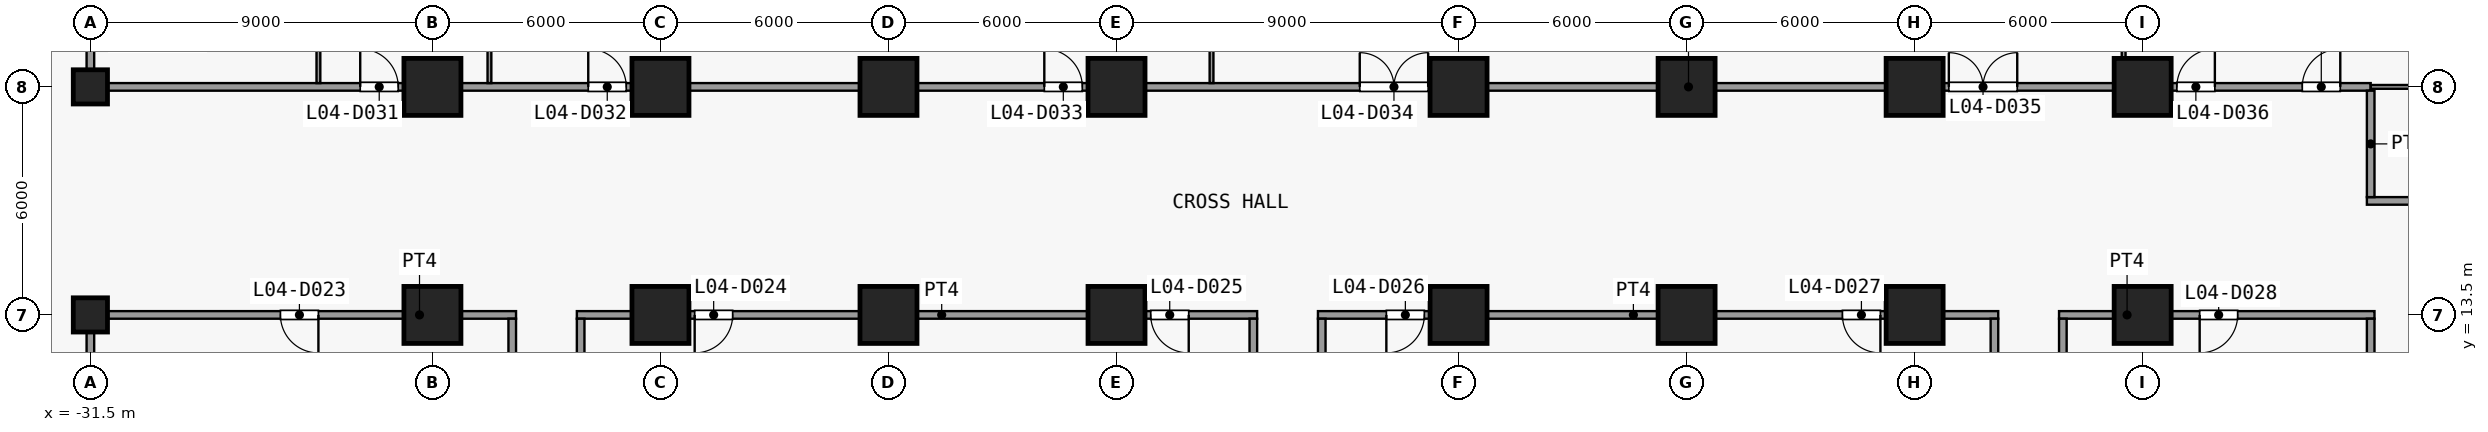
"""IFC4 building model, lengths in metres.
Left out: names, types, materials, properties, quantities, classifications, styles, units other than length and angle.
Written with IfcOpenShell. Run it as: python <this file> out.ifc"""

import sys

from ifc_helpers import new_model, si_unit, direction, frame, frame_2d, origin, origin_2d, place, context, subcontext, project, spatial, rectangle, extrude, element, fill, save


model = new_model("IFC4")
c1 = context("Model", 3, precision=1e-05, world=origin(), true_north=direction((0.0, 1.0)))
c2 = subcontext(c1, "Body", "Model", "MODEL_VIEW")
j1 = project(units=[si_unit("LENGTHUNIT", "METRE"), si_unit("PLANEANGLEUNIT", "RADIAN")], contexts=[c1])
p1 = place(None, origin())
s1 = spatial("IfcSite", under=j1, at=p1, CompositionType="ELEMENT")
p2 = place(p1, origin())
s2 = spatial("IfcBuilding", under=s1, at=p2, CompositionType="ELEMENT")
p3 = place(p2, frame((0.0, 0.0, 23.5)))
s3 = spatial("IfcBuildingStorey", under=s2, at=p3, CompositionType="ELEMENT", Elevation=23.5)
for number, where, z_axis, x_axis in (
    (1, (-31.5, 13.5, 0.0), (0.0, 0.0, 1.0), (1.0, 0.0, 0.0)),
    (2, (-31.5, 19.5, 0.0), (0.0, 0.0, 1.0), (1.0, 0.0, 0.0)),
):
    element("IfcColumn", number, at=place(p3, frame(where, z_axis=z_axis, x_axis=x_axis)), inside=s3, PredefinedType="COLUMN", context=c2, shape_type="SweptSolid", body=[
        extrude(rectangle(XDim=0.9, YDim=0.9, at=origin_2d()), origin(), (0.0, 0.0, 1.0), 4.5),
    ])
for number, where, z_axis, x_axis in (
    (3, (-22.5, 13.5, 0.0), (0.0, 0.0, 1.0), (1.0, 0.0, 0.0)),
    (4, (-22.5, 19.5, 0.0), (0.0, 0.0, 1.0), (1.0, 0.0, 0.0)),
    (5, (-16.5, 13.5, 0.0), (0.0, 0.0, 1.0), (1.0, 0.0, 0.0)),
    (6, (-16.5, 19.5, 0.0), (0.0, 0.0, 1.0), (1.0, 0.0, 0.0)),
    (7, (-10.5, 13.5, 0.0), (0.0, 0.0, 1.0), (1.0, 0.0, 0.0)),
    (8, (-10.5, 19.5, 0.0), (0.0, 0.0, 1.0), (1.0, 0.0, 0.0)),
    (9, (-4.5, 13.5, 0.0), (0.0, 0.0, 1.0), (1.0, 0.0, 0.0)),
    (10, (-4.5, 19.5, 0.0), (0.0, 0.0, 1.0), (1.0, 0.0, 0.0)),
    (11, (4.5, 13.5, 0.0), (0.0, 0.0, 1.0), (1.0, 0.0, 0.0)),
    (12, (4.5, 19.5, 0.0), (0.0, 0.0, 1.0), (1.0, 0.0, 0.0)),
    (13, (10.5, 13.5, 0.0), (0.0, 0.0, 1.0), (1.0, 0.0, 0.0)),
    (14, (10.5, 19.5, 0.0), (0.0, 0.0, 1.0), (1.0, 0.0, 0.0)),
    (15, (16.5, 13.5, 0.0), (0.0, 0.0, 1.0), (1.0, 0.0, 0.0)),
    (16, (16.5, 19.5, 0.0), (0.0, 0.0, 1.0), (1.0, 0.0, 0.0)),
    (17, (22.5, 13.5, 0.0), (0.0, 0.0, 1.0), (1.0, 0.0, 0.0)),
    (18, (22.5, 19.5, 0.0), (0.0, 0.0, 1.0), (1.0, 0.0, 0.0)),
):
    element("IfcColumn", number, at=place(p3, frame(where, z_axis=z_axis, x_axis=x_axis)), inside=s3, PredefinedType="COLUMN", context=c2, shape_type="SweptSolid", body=[
        extrude(rectangle(XDim=1.5, YDim=1.5, at=origin_2d()), origin(), (0.0, 0.0, 1.0), 4.5),
    ])
p4 = place(p3, frame((-31.6, 13.5, 0.0), z_axis=(0.0, 0.0, 1.0), x_axis=(1.0, 0.0, 0.0)))
e19 = element("IfcWall", 19, at=p4, inside=s3, PredefinedType="PARTITIONING", context=c2, shape_type="SweptSolid", body=[
    extrude(rectangle(XDim=11.3, YDim=0.2, at=frame_2d((5.65, 0.0))), origin(), (0.0, 0.0, 1.0), 4.15),
])
p5 = place(p4, frame((5.1, 0.0, 0.0)))
e20 = element("IfcOpeningElement", 20, at=p5, cuts=e19, PredefinedType="OPENING", context=c2, shape_type="SweptSolid", body=[
    extrude(rectangle(XDim=1.0, YDim=2.1, at=frame_2d((0.5, 1.05))), frame((0.0, 0.11, 0.0), z_axis=(0.0, -1.0, 0.0), x_axis=(1.0, 0.0, 0.0)), (0.0, 0.0, 1.0), 0.22),
])
p6 = place(p3, frame((-18.7, 13.5, 0.0), z_axis=(0.0, 0.0, 1.0), x_axis=(1.0, 0.0, 0.0)))
e21 = element("IfcWall", 21, at=p6, inside=s3, PredefinedType="PARTITIONING", context=c2, shape_type="SweptSolid", body=[
    extrude(rectangle(XDim=17.9, YDim=0.2, at=frame_2d((8.95, 0.0))), origin(), (0.0, 0.0, 1.0), 4.15),
])
p7 = place(p6, frame((3.1, 0.0, 0.0)))
e22 = element("IfcOpeningElement", 22, at=p7, cuts=e21, PredefinedType="OPENING", context=c2, shape_type="SweptSolid", body=[
    extrude(rectangle(XDim=1.0, YDim=2.1, at=frame_2d((0.5, 1.05))), frame((0.0, 0.11, 0.0), z_axis=(0.0, -1.0, 0.0), x_axis=(1.0, 0.0, 0.0)), (0.0, 0.0, 1.0), 0.22),
])
p8 = place(p6, frame((15.1, 0.0, 0.0)))
e23 = element("IfcOpeningElement", 23, at=p8, cuts=e21, PredefinedType="OPENING", context=c2, shape_type="SweptSolid", body=[
    extrude(rectangle(XDim=1.0, YDim=2.1, at=frame_2d((0.5, 1.05))), frame((0.0, 0.11, 0.0), z_axis=(0.0, -1.0, 0.0), x_axis=(1.0, 0.0, 0.0)), (0.0, 0.0, 1.0), 0.22),
])
p9 = place(p3, frame((0.8, 13.5, 0.0), z_axis=(0.0, 0.0, 1.0), x_axis=(1.0, 0.0, 0.0)))
e24 = element("IfcWall", 24, at=p9, inside=s3, PredefinedType="PARTITIONING", context=c2, shape_type="SweptSolid", body=[
    extrude(rectangle(XDim=17.9, YDim=0.2, at=frame_2d((8.95, 0.0))), origin(), (0.0, 0.0, 1.0), 4.15),
])
p10 = place(p9, frame((1.8, 0.0, 0.0)))
e25 = element("IfcOpeningElement", 25, at=p10, cuts=e24, PredefinedType="OPENING", context=c2, shape_type="SweptSolid", body=[
    extrude(rectangle(XDim=1.0, YDim=2.1, at=frame_2d((0.5, 1.05))), frame((0.0, 0.11, 0.0), z_axis=(0.0, -1.0, 0.0), x_axis=(1.0, 0.0, 0.0)), (0.0, 0.0, 1.0), 0.22),
])
p11 = place(p9, frame((13.8, 0.0, 0.0)))
e26 = element("IfcOpeningElement", 26, at=p11, cuts=e24, PredefinedType="OPENING", context=c2, shape_type="SweptSolid", body=[
    extrude(rectangle(XDim=1.0, YDim=2.1, at=frame_2d((0.5, 1.05))), frame((0.0, 0.11, 0.0), z_axis=(0.0, -1.0, 0.0), x_axis=(1.0, 0.0, 0.0)), (0.0, 0.0, 1.0), 0.22),
])
p12 = place(p3, frame((20.3, 13.5, 0.0), z_axis=(0.0, 0.0, 1.0), x_axis=(1.0, 0.0, 0.0)))
e27 = element("IfcWall", 27, at=p12, inside=s3, PredefinedType="PARTITIONING", context=c2, shape_type="SweptSolid", body=[
    extrude(rectangle(XDim=8.3, YDim=0.2, at=frame_2d((4.15, 0.0))), origin(), (0.0, 0.0, 1.0), 4.15),
])
p13 = place(p12, frame((3.7, 0.0, 0.0)))
e28 = element("IfcOpeningElement", 28, at=p13, cuts=e27, PredefinedType="OPENING", context=c2, shape_type="SweptSolid", body=[
    extrude(rectangle(XDim=1.0, YDim=2.1, at=frame_2d((0.5, 1.05))), frame((0.0, 0.11, 0.0), z_axis=(0.0, -1.0, 0.0), x_axis=(1.0, 0.0, 0.0)), (0.0, 0.0, 1.0), 0.22),
])
p14 = place(p3, frame((28.4, 16.5, 0.0), z_axis=(0.0, 0.0, 1.0), x_axis=(1.0, 0.0, 0.0)))
e29 = element("IfcWall", 29, at=p14, inside=s3, PredefinedType="PARTITIONING", context=c2, shape_type="SweptSolid", body=[
    extrude(rectangle(XDim=24.2, YDim=0.2, at=frame_2d((12.1, 0.0))), origin(), (0.0, 0.0, 1.0), 4.15),
])
p15 = place(p14, frame((6.2, 0.0, 0.0)))
e30 = element("IfcOpeningElement", 30, at=p15, cuts=e29, PredefinedType="OPENING", context=c2, shape_type="SweptSolid", body=[
    extrude(rectangle(XDim=1.0, YDim=2.1, at=frame_2d((0.5, 1.05))), frame((0.0, 0.11, 0.0), z_axis=(0.0, -1.0, 0.0), x_axis=(1.0, 0.0, 0.0)), (0.0, 0.0, 1.0), 0.22),
])
p16 = place(p14, frame((17.0, 0.0, 0.0)))
e31 = element("IfcOpeningElement", 31, at=p16, cuts=e29, PredefinedType="OPENING", context=c2, shape_type="SweptSolid", body=[
    extrude(rectangle(XDim=1.0, YDim=2.1, at=frame_2d((0.5, 1.05))), frame((0.0, 0.11, 0.0), z_axis=(0.0, -1.0, 0.0), x_axis=(1.0, 0.0, 0.0)), (0.0, 0.0, 1.0), 0.22),
])
p17 = place(p3, frame((-31.6, 19.5, 0.0), z_axis=(0.0, 0.0, 1.0), x_axis=(1.0, 0.0, 0.0)))
e32 = element("IfcWall", 32, at=p17, inside=s3, PredefinedType="PARTITIONING", context=c2, shape_type="SweptSolid", body=[
    extrude(rectangle(XDim=60.1, YDim=0.2, at=frame_2d((30.05, 0.0))), origin(), (0.0, 0.0, 1.0), 4.15),
])
p18 = place(p17, frame((7.2, 0.0, 0.0)))
e33 = element("IfcOpeningElement", 33, at=p18, cuts=e32, PredefinedType="OPENING", context=c2, shape_type="SweptSolid", body=[
    extrude(rectangle(XDim=1.0, YDim=2.1, at=frame_2d((0.5, 1.05))), frame((0.0, 0.11, 0.0), z_axis=(0.0, -1.0, 0.0), x_axis=(1.0, 0.0, 0.0)), (0.0, 0.0, 1.0), 0.22),
])
p19 = place(p17, frame((13.2, 0.0, 0.0)))
e34 = element("IfcOpeningElement", 34, at=p19, cuts=e32, PredefinedType="OPENING", context=c2, shape_type="SweptSolid", body=[
    extrude(rectangle(XDim=1.0, YDim=2.1, at=frame_2d((0.5, 1.05))), frame((0.0, 0.11, 0.0), z_axis=(0.0, -1.0, 0.0), x_axis=(1.0, 0.0, 0.0)), (0.0, 0.0, 1.0), 0.22),
])
p20 = place(p17, frame((25.2, 0.0, 0.0)))
e35 = element("IfcOpeningElement", 35, at=p20, cuts=e32, PredefinedType="OPENING", context=c2, shape_type="SweptSolid", body=[
    extrude(rectangle(XDim=1.0, YDim=2.1, at=frame_2d((0.5, 1.05))), frame((0.0, 0.11, 0.0), z_axis=(0.0, -1.0, 0.0), x_axis=(1.0, 0.0, 0.0)), (0.0, 0.0, 1.0), 0.22),
])
p21 = place(p17, frame((33.5, 0.0, 0.0)))
e36 = element("IfcOpeningElement", 36, at=p21, cuts=e32, PredefinedType="OPENING", context=c2, shape_type="SweptSolid", body=[
    extrude(rectangle(XDim=1.8, YDim=2.1, at=frame_2d((0.9, 1.05))), frame((0.0, 0.11, 0.0), z_axis=(0.0, -1.0, 0.0), x_axis=(1.0, 0.0, 0.0)), (0.0, 0.0, 1.0), 0.22),
])
p22 = place(p17, frame((49.0, 0.0, 0.0)))
e37 = element("IfcOpeningElement", 37, at=p22, cuts=e32, PredefinedType="OPENING", context=c2, shape_type="SweptSolid", body=[
    extrude(rectangle(XDim=1.8, YDim=2.1, at=frame_2d((0.9, 1.05))), frame((0.0, 0.11, 0.0), z_axis=(0.0, -1.0, 0.0), x_axis=(1.0, 0.0, 0.0)), (0.0, 0.0, 1.0), 0.22),
])
p23 = place(p17, frame((55.0, 0.0, 0.0)))
e38 = element("IfcOpeningElement", 38, at=p23, cuts=e32, PredefinedType="OPENING", context=c2, shape_type="SweptSolid", body=[
    extrude(rectangle(XDim=1.0, YDim=2.1, at=frame_2d((0.5, 1.05))), frame((0.0, 0.11, 0.0), z_axis=(0.0, -1.0, 0.0), x_axis=(1.0, 0.0, 0.0)), (0.0, 0.0, 1.0), 0.22),
])
p24 = place(p17, frame((58.3, 0.0, 0.0)))
e39 = element("IfcOpeningElement", 39, at=p24, cuts=e32, PredefinedType="OPENING", context=c2, shape_type="SweptSolid", body=[
    extrude(rectangle(XDim=1.0, YDim=2.1, at=frame_2d((0.5, 1.05))), frame((0.0, 0.11, 0.0), z_axis=(0.0, -1.0, 0.0), x_axis=(1.0, 0.0, 0.0)), (0.0, 0.0, 1.0), 0.22),
])
p25 = place(p3, frame((28.5, 19.5, 0.0), z_axis=(0.0, 0.0, 1.0), x_axis=(1.0, 0.0, 0.0)))
e40 = element("IfcWall", 40, at=p25, inside=s3, PredefinedType="PARTITIONING", context=c2, shape_type="SweptSolid", body=[
    extrude(rectangle(XDim=23.9, YDim=0.1, at=frame_2d((11.95, 0.0))), origin(), (0.0, 0.0, 1.0), 4.15),
])
p26 = place(p3, frame((-31.5, 1.6, 0.0), z_axis=(0.0, 0.0, 1.0), x_axis=(0.0, 1.0, 0.0)))
e41 = element("IfcWall", 41, at=p26, inside=s3, PredefinedType="PARTITIONING", context=c2, shape_type="SweptSolid", body=[
    extrude(rectangle(XDim=11.8, YDim=0.2, at=frame_2d((5.9, 0.0))), origin(), (0.0, 0.0, 1.0), 4.15),
])
p27 = place(p3, frame((-31.5, 19.6, 0.0), z_axis=(0.0, 0.0, 1.0), x_axis=(0.0, 1.0, 0.0)))
e42 = element("IfcWall", 42, at=p27, inside=s3, PredefinedType="PARTITIONING", context=c2, shape_type="SweptSolid", body=[
    extrude(rectangle(XDim=11.8, YDim=0.2, at=frame_2d((5.9, 0.0))), origin(), (0.0, 0.0, 1.0), 4.15),
])
p28 = place(p27, frame((2.4, 0.0, 0.0)))
e43 = element("IfcOpeningElement", 43, at=p28, cuts=e42, PredefinedType="OPENING", context=c2, shape_type="SweptSolid", body=[
    extrude(rectangle(XDim=1.0, YDim=2.1, at=frame_2d((0.5, 1.05))), frame((0.0, 0.11, 0.0), z_axis=(0.0, -1.0, 0.0), x_axis=(1.0, 0.0, 0.0)), (0.0, 0.0, 1.0), 0.22),
])
p29 = place(p27, frame((8.3, 0.0, 0.0)))
e44 = element("IfcOpeningElement", 44, at=p29, cuts=e42, PredefinedType="OPENING", context=c2, shape_type="SweptSolid", body=[
    extrude(rectangle(XDim=1.0, YDim=2.1, at=frame_2d((0.5, 1.05))), frame((0.0, 0.11, 0.0), z_axis=(0.0, -1.0, 0.0), x_axis=(1.0, 0.0, 0.0)), (0.0, 0.0, 1.0), 0.22),
])
for number, where, z_axis, x_axis in (
    (45, (-25.5, 19.6, 0.0), (0.0, 0.0, 1.0), (0.0, 1.0, 0.0)),
    (46, (-21.0, 19.6, 0.0), (0.0, 0.0, 1.0), (0.0, 1.0, 0.0)),
):
    element("IfcWall", number, at=place(p3, frame(where, z_axis=z_axis, x_axis=x_axis)), inside=s3, PredefinedType="PARTITIONING", context=c2, shape_type="SweptSolid", body=[
        extrude(rectangle(XDim=5.85, YDim=0.1, at=frame_2d((2.925, 0.0))), origin(), (0.0, 0.0, 1.0), 4.15),
    ])
for number, where, z_axis, x_axis in (
    (47, (-20.4, 1.6, 0.0), (0.0, 0.0, 1.0), (0.0, 1.0, 0.0)),
    (48, (-18.6, 1.6, 0.0), (0.0, 0.0, 1.0), (0.0, 1.0, 0.0)),
):
    element("IfcWall", number, at=place(p3, frame(where, z_axis=z_axis, x_axis=x_axis)), inside=s3, PredefinedType="PARTITIONING", context=c2, shape_type="SweptSolid", body=[
        extrude(rectangle(XDim=11.8, YDim=0.2, at=frame_2d((5.9, 0.0))), origin(), (0.0, 0.0, 1.0), 4.15),
    ])
p30 = place(p3, frame((-2.0, 19.6, 0.0), z_axis=(0.0, 0.0, 1.0), x_axis=(0.0, 1.0, 0.0)))
e49 = element("IfcWall", 49, at=p30, inside=s3, PredefinedType="PARTITIONING", context=c2, shape_type="SweptSolid", body=[
    extrude(rectangle(XDim=5.85, YDim=0.1, at=frame_2d((2.925, 0.0))), origin(), (0.0, 0.0, 1.0), 4.15),
])
for number, where, z_axis, x_axis in (
    (50, (-0.9, 1.6, 0.0), (0.0, 0.0, 1.0), (0.0, 1.0, 0.0)),
    (51, (0.9, 1.6, 0.0), (0.0, 0.0, 1.0), (0.0, 1.0, 0.0)),
    (52, (18.6, 1.6, 0.0), (0.0, 0.0, 1.0), (0.0, 1.0, 0.0)),
    (53, (20.4, 1.6, 0.0), (0.0, 0.0, 1.0), (0.0, 1.0, 0.0)),
):
    element("IfcWall", number, at=place(p3, frame(where, z_axis=z_axis, x_axis=x_axis)), inside=s3, PredefinedType="PARTITIONING", context=c2, shape_type="SweptSolid", body=[
        extrude(rectangle(XDim=11.8, YDim=0.2, at=frame_2d((5.9, 0.0))), origin(), (0.0, 0.0, 1.0), 4.15),
    ])
p31 = place(p3, frame((22.0, 19.6, 0.0), z_axis=(0.0, 0.0, 1.0), x_axis=(0.0, 1.0, 0.0)))
e54 = element("IfcWall", 54, at=p31, inside=s3, PredefinedType="PARTITIONING", context=c2, shape_type="SweptSolid", body=[
    extrude(rectangle(XDim=5.85, YDim=0.1, at=frame_2d((2.925, 0.0))), origin(), (0.0, 0.0, 1.0), 4.15),
])
p32 = place(p3, frame((28.5, 1.6, 0.0), z_axis=(0.0, 0.0, 1.0), x_axis=(0.0, 1.0, 0.0)))
e55 = element("IfcWall", 55, at=p32, inside=s3, PredefinedType="PARTITIONING", context=c2, shape_type="SweptSolid", body=[
    extrude(rectangle(XDim=11.8, YDim=0.2, at=frame_2d((5.9, 0.0))), origin(), (0.0, 0.0, 1.0), 4.15),
])
p33 = place(p3, frame((28.5, 16.6, 0.0), z_axis=(0.0, 0.0, 1.0), x_axis=(0.0, 1.0, 0.0)))
e56 = element("IfcWall", 56, at=p33, inside=s3, PredefinedType="PARTITIONING", context=c2, shape_type="SweptSolid", body=[
    extrude(rectangle(XDim=2.8, YDim=0.2, at=frame_2d((1.4, 0.0))), origin(), (0.0, 0.0, 1.0), 4.15),
])
p34 = place(p5, origin())
e57 = element("IfcDoor", 57, at=p34, inside=s3, OperationType="SINGLE_SWING_RIGHT", PredefinedType="DOOR", context=c2, shape_type="SweptSolid", body=[
    extrude(rectangle(XDim=1.0, YDim=2.1, at=frame_2d((0.5, 1.05))), frame((0.0, 0.025, 0.0), z_axis=(0.0, -1.0, 0.0), x_axis=(1.0, 0.0, 0.0)), (0.0, 0.0, 1.0), 0.05),
])
fill(e20, e57)
p35 = place(p7, origin())
e58 = element("IfcDoor", 58, at=p35, inside=s3, OperationType="SINGLE_SWING_LEFT", PredefinedType="DOOR", context=c2, shape_type="SweptSolid", body=[
    extrude(rectangle(XDim=1.0, YDim=2.1, at=frame_2d((0.5, 1.05))), frame((0.0, 0.025, 0.0), z_axis=(0.0, -1.0, 0.0), x_axis=(1.0, 0.0, 0.0)), (0.0, 0.0, 1.0), 0.05),
])
fill(e22, e58)
p36 = place(p8, origin())
e59 = element("IfcDoor", 59, at=p36, inside=s3, OperationType="SINGLE_SWING_RIGHT", PredefinedType="DOOR", context=c2, shape_type="SweptSolid", body=[
    extrude(rectangle(XDim=1.0, YDim=2.1, at=frame_2d((0.5, 1.05))), frame((0.0, 0.025, 0.0), z_axis=(0.0, -1.0, 0.0), x_axis=(1.0, 0.0, 0.0)), (0.0, 0.0, 1.0), 0.05),
])
fill(e23, e59)
p37 = place(p10, origin())
e60 = element("IfcDoor", 60, at=p37, inside=s3, OperationType="SINGLE_SWING_LEFT", PredefinedType="DOOR", context=c2, shape_type="SweptSolid", body=[
    extrude(rectangle(XDim=1.0, YDim=2.1, at=frame_2d((0.5, 1.05))), frame((0.0, 0.025, 0.0), z_axis=(0.0, -1.0, 0.0), x_axis=(1.0, 0.0, 0.0)), (0.0, 0.0, 1.0), 0.05),
])
fill(e25, e60)
p38 = place(p11, origin())
e61 = element("IfcDoor", 61, at=p38, inside=s3, OperationType="SINGLE_SWING_RIGHT", PredefinedType="DOOR", context=c2, shape_type="SweptSolid", body=[
    extrude(rectangle(XDim=1.0, YDim=2.1, at=frame_2d((0.5, 1.05))), frame((0.0, 0.025, 0.0), z_axis=(0.0, -1.0, 0.0), x_axis=(1.0, 0.0, 0.0)), (0.0, 0.0, 1.0), 0.05),
])
fill(e26, e61)
p39 = place(p13, origin())
e62 = element("IfcDoor", 62, at=p39, inside=s3, OperationType="SINGLE_SWING_LEFT", PredefinedType="DOOR", context=c2, shape_type="SweptSolid", body=[
    extrude(rectangle(XDim=1.0, YDim=2.1, at=frame_2d((0.5, 1.05))), frame((0.0, 0.025, 0.0), z_axis=(0.0, -1.0, 0.0), x_axis=(1.0, 0.0, 0.0)), (0.0, 0.0, 1.0), 0.05),
])
fill(e28, e62)
p40 = place(p18, origin())
e63 = element("IfcDoor", 63, at=p40, inside=s3, OperationType="SINGLE_SWING_RIGHT", PredefinedType="DOOR", context=c2, shape_type="SweptSolid", body=[
    extrude(rectangle(XDim=1.0, YDim=2.1, at=frame_2d((0.5, 1.05))), frame((0.0, 0.025, 0.0), z_axis=(0.0, -1.0, 0.0), x_axis=(1.0, 0.0, 0.0)), (0.0, 0.0, 1.0), 0.05),
])
fill(e33, e63)
p41 = place(p19, origin())
e64 = element("IfcDoor", 64, at=p41, inside=s3, OperationType="SINGLE_SWING_RIGHT", PredefinedType="DOOR", context=c2, shape_type="SweptSolid", body=[
    extrude(rectangle(XDim=1.0, YDim=2.1, at=frame_2d((0.5, 1.05))), frame((0.0, 0.025, 0.0), z_axis=(0.0, -1.0, 0.0), x_axis=(1.0, 0.0, 0.0)), (0.0, 0.0, 1.0), 0.05),
])
fill(e34, e64)
p42 = place(p20, origin())
e65 = element("IfcDoor", 65, at=p42, inside=s3, OperationType="SINGLE_SWING_RIGHT", PredefinedType="DOOR", context=c2, shape_type="SweptSolid", body=[
    extrude(rectangle(XDim=1.0, YDim=2.1, at=frame_2d((0.5, 1.05))), frame((0.0, 0.025, 0.0), z_axis=(0.0, -1.0, 0.0), x_axis=(1.0, 0.0, 0.0)), (0.0, 0.0, 1.0), 0.05),
])
fill(e35, e65)
p43 = place(p21, origin())
e66 = element("IfcDoor", 66, at=p43, inside=s3, OperationType="DOUBLE_DOOR_SINGLE_SWING", PredefinedType="DOOR", context=c2, shape_type="SweptSolid", body=[
    extrude(rectangle(XDim=1.8, YDim=2.1, at=frame_2d((0.9, 1.05))), frame((0.0, 0.025, 0.0), z_axis=(0.0, -1.0, 0.0), x_axis=(1.0, 0.0, 0.0)), (0.0, 0.0, 1.0), 0.05),
])
fill(e36, e66)
p44 = place(p22, origin())
e67 = element("IfcDoor", 67, at=p44, inside=s3, OperationType="DOUBLE_DOOR_SINGLE_SWING", PredefinedType="DOOR", context=c2, shape_type="SweptSolid", body=[
    extrude(rectangle(XDim=1.8, YDim=2.1, at=frame_2d((0.9, 1.05))), frame((0.0, 0.025, 0.0), z_axis=(0.0, -1.0, 0.0), x_axis=(1.0, 0.0, 0.0)), (0.0, 0.0, 1.0), 0.05),
])
fill(e37, e67)
p45 = place(p23, origin())
e68 = element("IfcDoor", 68, at=p45, inside=s3, OperationType="SINGLE_SWING_LEFT", PredefinedType="DOOR", context=c2, shape_type="SweptSolid", body=[
    extrude(rectangle(XDim=1.0, YDim=2.1, at=frame_2d((0.5, 1.05))), frame((0.0, 0.025, 0.0), z_axis=(0.0, -1.0, 0.0), x_axis=(1.0, 0.0, 0.0)), (0.0, 0.0, 1.0), 0.05),
])
fill(e38, e68)
p46 = place(p24, origin())
e69 = element("IfcDoor", 69, at=p46, inside=s3, OperationType="SINGLE_SWING_LEFT", PredefinedType="DOOR", context=c2, shape_type="SweptSolid", body=[
    extrude(rectangle(XDim=1.0, YDim=2.1, at=frame_2d((0.5, 1.05))), frame((0.0, 0.025, 0.0), z_axis=(0.0, -1.0, 0.0), x_axis=(1.0, 0.0, 0.0)), (0.0, 0.0, 1.0), 0.05),
])
fill(e39, e69)
save(model, sys.argv[1])
